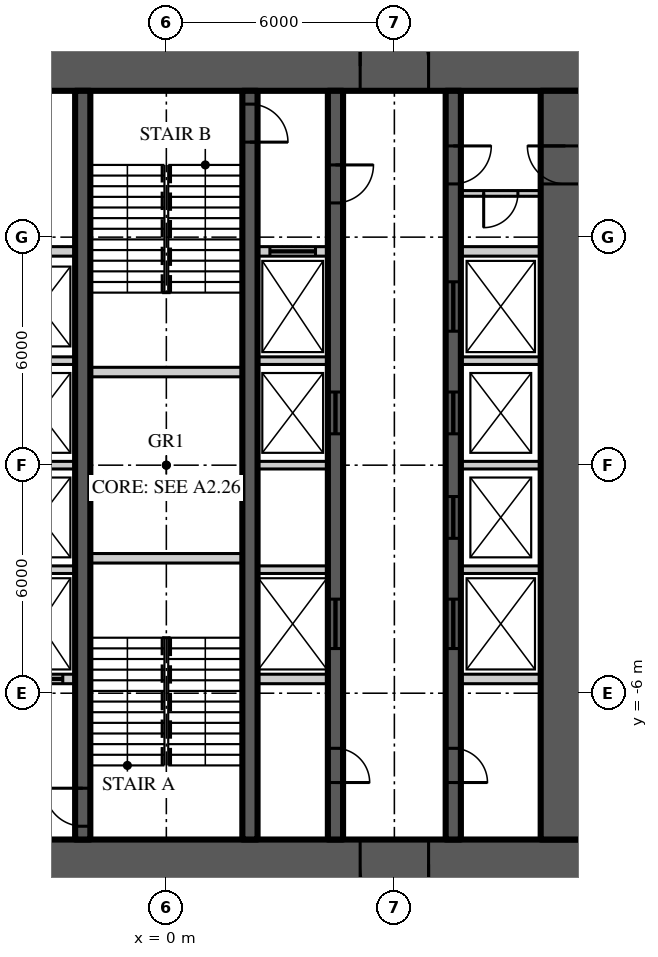
"""IFC4 building model, lengths in metres.
Left out: names, types, materials, properties, quantities, classifications, styles, units other than length and angle.
Written with IfcOpenShell. Run it as: python <this file> out.ifc"""

import sys

from ifc_helpers import new_model, si_unit, direction, frame, frame_2d, origin, place, context, subcontext, project, spatial, rectangle, extrude, element, fill, save


model = new_model("IFC4")
c1 = context("Model", 3, precision=1e-05, world=origin(), true_north=direction((0.0, 1.0)))
c2 = subcontext(c1, "Body", "Model", "MODEL_VIEW")
j1 = project(units=[si_unit("LENGTHUNIT", "METRE"), si_unit("PLANEANGLEUNIT", "RADIAN")], contexts=[c1])
p1 = place(None, origin())
s1 = spatial("IfcSite", under=j1, at=p1, CompositionType="ELEMENT")
p2 = place(p1, origin())
s2 = spatial("IfcBuilding", under=s1, at=p2, CompositionType="ELEMENT")
p3 = place(p2, frame((0.0, 0.0, 194.4)))
s3 = spatial("IfcBuildingStorey", under=s2, at=p3, CompositionType="ELEMENT", Elevation=194.4)
p4 = place(p3, frame((-11.15, 10.5, 0.0), z_axis=(0.0, 0.0, 1.0), x_axis=(1.0, 0.0, 0.0)))
e1 = element("IfcWall", 1, at=p4, inside=s3, PredefinedType="SHEAR", context=c2, shape_type="SweptSolid", body=[
    extrude(rectangle(XDim=22.3, YDim=1.3, at=frame_2d((11.15, 0.0))), origin(), (0.0, 0.0, 1.0), 4.5),
])
p5 = place(p4, frame((4.25, 0.0, 0.0)))
e2 = element("IfcOpeningElement", 2, at=p5, cuts=e1, PredefinedType="OPENING", context=c2, shape_type="SweptSolid", body=[
    extrude(rectangle(XDim=1.8, YDim=2.2, at=frame_2d((0.9, 1.1))), frame((0.0, 0.66, 0.0), z_axis=(0.0, -1.0, 0.0), x_axis=(1.0, 0.0, 0.0)), (0.0, 0.0, 1.0), 1.32),
])
p6 = place(p4, frame((16.25, 0.0, 0.0)))
e3 = element("IfcOpeningElement", 3, at=p6, cuts=e1, PredefinedType="OPENING", context=c2, shape_type="SweptSolid", body=[
    extrude(rectangle(XDim=1.8, YDim=2.2, at=frame_2d((0.9, 1.1))), frame((0.0, 0.66, 0.0), z_axis=(0.0, -1.0, 0.0), x_axis=(1.0, 0.0, 0.0)), (0.0, 0.0, 1.0), 1.32),
])
p7 = place(p3, frame((11.15, -10.5, 0.0), z_axis=(0.0, 0.0, 1.0), x_axis=(-1.0, 0.0, 0.0)))
e4 = element("IfcWall", 4, at=p7, inside=s3, PredefinedType="SHEAR", context=c2, shape_type="SweptSolid", body=[
    extrude(rectangle(XDim=22.3, YDim=1.3, at=frame_2d((11.15, 0.0))), origin(), (0.0, 0.0, 1.0), 4.5),
])
p8 = place(p7, frame((16.25, 0.0, 0.0)))
e5 = element("IfcOpeningElement", 5, at=p8, cuts=e4, PredefinedType="OPENING", context=c2, shape_type="SweptSolid", body=[
    extrude(rectangle(XDim=1.8, YDim=2.2, at=frame_2d((0.9, 1.1))), frame((0.0, 0.66, 0.0), z_axis=(0.0, -1.0, 0.0), x_axis=(1.0, 0.0, 0.0)), (0.0, 0.0, 1.0), 1.32),
])
p9 = place(p7, frame((4.25, 0.0, 0.0)))
e6 = element("IfcOpeningElement", 6, at=p9, cuts=e4, PredefinedType="OPENING", context=c2, shape_type="SweptSolid", body=[
    extrude(rectangle(XDim=1.8, YDim=2.2, at=frame_2d((0.9, 1.1))), frame((0.0, 0.66, 0.0), z_axis=(0.0, -1.0, 0.0), x_axis=(1.0, 0.0, 0.0)), (0.0, 0.0, 1.0), 1.32),
])
p10 = place(p3, frame((10.5, -9.85, 0.0), z_axis=(0.0, 0.0, 1.0), x_axis=(0.0, 1.0, 0.0)))
e7 = element("IfcWall", 7, at=p10, inside=s3, PredefinedType="SHEAR", context=c2, shape_type="SweptSolid", body=[
    extrude(rectangle(XDim=19.7, YDim=1.3, at=frame_2d((9.85, 0.0))), origin(), (0.0, 0.0, 1.0), 4.5),
])
p11 = place(p10, frame((17.25, 0.0, 0.0)))
e8 = element("IfcOpeningElement", 8, at=p11, cuts=e7, PredefinedType="OPENING", context=c2, shape_type="SweptSolid", body=[
    extrude(rectangle(XDim=1.0, YDim=2.2, at=frame_2d((0.5, 1.1))), frame((0.0, 0.66, 0.0), z_axis=(0.0, -1.0, 0.0), x_axis=(1.0, 0.0, 0.0)), (0.0, 0.0, 1.0), 1.32),
])
p12 = place(p3, frame((7.55, 9.85, 0.0), z_axis=(0.0, 0.0, 1.0), x_axis=(0.0, -1.0, 0.0)))
e9 = element("IfcWall", 9, at=p12, inside=s3, PredefinedType="SHEAR", context=c2, shape_type="SweptSolid", body=[
    extrude(rectangle(XDim=19.7, YDim=0.4, at=frame_2d((9.85, 0.0))), origin(), (0.0, 0.0, 1.0), 4.5),
])
p13 = place(p12, frame((1.45, 0.0, 0.0)))
e10 = element("IfcOpeningElement", 10, at=p13, cuts=e9, PredefinedType="OPENING", context=c2, shape_type="SweptSolid", body=[
    extrude(rectangle(XDim=1.0, YDim=2.2, at=frame_2d((0.5, 1.1))), frame((0.0, 0.21, 0.0), z_axis=(0.0, -1.0, 0.0), x_axis=(1.0, 0.0, 0.0)), (0.0, 0.0, 1.0), 0.42),
])
p14 = place(p12, frame((17.3, 0.0, 0.0)))
e11 = element("IfcOpeningElement", 11, at=p14, cuts=e9, PredefinedType="OPENING", context=c2, shape_type="SweptSolid", body=[
    extrude(rectangle(XDim=0.9, YDim=2.1, at=frame_2d((0.45, 1.05))), frame((0.0, 0.21, 0.0), z_axis=(0.0, -1.0, 0.0), x_axis=(1.0, 0.0, 0.0)), (0.0, 0.0, 1.0), 0.42),
])
p15 = place(p12, frame((7.925, 0.0, 0.0)))
e12 = element("IfcOpeningElement", 12, at=p15, cuts=e9, PredefinedType="OPENING", context=c2, shape_type="SweptSolid", body=[
    extrude(rectangle(XDim=1.1, YDim=2.2, at=frame_2d((0.55, 1.1))), frame((0.0, 0.21, 0.0), z_axis=(0.0, -1.0, 0.0), x_axis=(1.0, 0.0, 0.0)), (0.0, 0.0, 1.0), 0.42),
])
p16 = place(p12, frame((10.675, 0.0, 0.0)))
e13 = element("IfcOpeningElement", 13, at=p16, cuts=e9, PredefinedType="OPENING", context=c2, shape_type="SweptSolid", body=[
    extrude(rectangle(XDim=1.1, YDim=2.2, at=frame_2d((0.55, 1.1))), frame((0.0, 0.21, 0.0), z_axis=(0.0, -1.0, 0.0), x_axis=(1.0, 0.0, 0.0)), (0.0, 0.0, 1.0), 0.42),
])
p17 = place(p12, frame((5.025, 0.0, 0.0)))
e14 = element("IfcOpeningElement", 14, at=p17, cuts=e9, PredefinedType="OPENING", context=c2, shape_type="SweptSolid", body=[
    extrude(rectangle(XDim=1.3, YDim=2.2, at=frame_2d((0.65, 1.1))), frame((0.0, 0.21, 0.0), z_axis=(0.0, -1.0, 0.0), x_axis=(1.0, 0.0, 0.0)), (0.0, 0.0, 1.0), 0.42),
])
p18 = place(p12, frame((13.375, 0.0, 0.0)))
e15 = element("IfcOpeningElement", 15, at=p18, cuts=e9, PredefinedType="OPENING", context=c2, shape_type="SweptSolid", body=[
    extrude(rectangle(XDim=1.3, YDim=2.2, at=frame_2d((0.65, 1.1))), frame((0.0, 0.21, 0.0), z_axis=(0.0, -1.0, 0.0), x_axis=(1.0, 0.0, 0.0)), (0.0, 0.0, 1.0), 0.42),
])
p19 = place(p3, frame((4.45, 9.85, 0.0), z_axis=(0.0, 0.0, 1.0), x_axis=(0.0, -1.0, 0.0)))
e16 = element("IfcWall", 16, at=p19, inside=s3, PredefinedType="SHEAR", context=c2, shape_type="SweptSolid", body=[
    extrude(rectangle(XDim=19.7, YDim=0.4, at=frame_2d((9.85, 0.0))), origin(), (0.0, 0.0, 1.0), 4.5),
])
p20 = place(p19, frame((1.95, 0.0, 0.0)))
e17 = element("IfcOpeningElement", 17, at=p20, cuts=e16, PredefinedType="OPENING", context=c2, shape_type="SweptSolid", body=[
    extrude(rectangle(XDim=1.0, YDim=2.2, at=frame_2d((0.5, 1.1))), frame((0.0, 0.21, 0.0), z_axis=(0.0, -1.0, 0.0), x_axis=(1.0, 0.0, 0.0)), (0.0, 0.0, 1.0), 0.42),
])
p21 = place(p19, frame((17.3, 0.0, 0.0)))
e18 = element("IfcOpeningElement", 18, at=p21, cuts=e16, PredefinedType="OPENING", context=c2, shape_type="SweptSolid", body=[
    extrude(rectangle(XDim=0.9, YDim=2.1, at=frame_2d((0.45, 1.05))), frame((0.0, 0.21, 0.0), z_axis=(0.0, -1.0, 0.0), x_axis=(1.0, 0.0, 0.0)), (0.0, 0.0, 1.0), 0.42),
])
p22 = place(p19, frame((7.925, 0.0, 0.0)))
e19 = element("IfcOpeningElement", 19, at=p22, cuts=e16, PredefinedType="OPENING", context=c2, shape_type="SweptSolid", body=[
    extrude(rectangle(XDim=1.1, YDim=2.2, at=frame_2d((0.55, 1.1))), frame((0.0, 0.21, 0.0), z_axis=(0.0, -1.0, 0.0), x_axis=(1.0, 0.0, 0.0)), (0.0, 0.0, 1.0), 0.42),
])
p23 = place(p19, frame((13.375, 0.0, 0.0)))
e20 = element("IfcOpeningElement", 20, at=p23, cuts=e16, PredefinedType="OPENING", context=c2, shape_type="SweptSolid", body=[
    extrude(rectangle(XDim=1.3, YDim=2.2, at=frame_2d((0.65, 1.1))), frame((0.0, 0.21, 0.0), z_axis=(0.0, -1.0, 0.0), x_axis=(1.0, 0.0, 0.0)), (0.0, 0.0, 1.0), 0.42),
])
p24 = place(p3, frame((-2.2, -9.85, 0.0), z_axis=(0.0, 0.0, 1.0), x_axis=(0.0, 1.0, 0.0)))
e21 = element("IfcWall", 21, at=p24, inside=s3, PredefinedType="SHEAR", context=c2, shape_type="SweptSolid", body=[
    extrude(rectangle(XDim=19.7, YDim=0.4, at=frame_2d((9.85, 0.0))), origin(), (0.0, 0.0, 1.0), 4.5),
])
p25 = place(p24, frame((0.35, 0.0, 0.0)))
e22 = element("IfcOpeningElement", 22, at=p25, cuts=e21, PredefinedType="OPENING", context=c2, shape_type="SweptSolid", body=[
    extrude(rectangle(XDim=1.0, YDim=2.2, at=frame_2d((0.5, 1.1))), frame((0.0, 0.21, 0.0), z_axis=(0.0, -1.0, 0.0), x_axis=(1.0, 0.0, 0.0)), (0.0, 0.0, 1.0), 0.42),
])
p26 = place(p3, frame((2.2, 9.85, 0.0), z_axis=(0.0, 0.0, 1.0), x_axis=(0.0, -1.0, 0.0)))
e23 = element("IfcWall", 23, at=p26, inside=s3, PredefinedType="SHEAR", context=c2, shape_type="SweptSolid", body=[
    extrude(rectangle(XDim=19.7, YDim=0.4, at=frame_2d((9.85, 0.0))), origin(), (0.0, 0.0, 1.0), 4.5),
])
p27 = place(p26, frame((0.35, 0.0, 0.0)))
e24 = element("IfcOpeningElement", 24, at=p27, cuts=e23, PredefinedType="OPENING", context=c2, shape_type="SweptSolid", body=[
    extrude(rectangle(XDim=1.0, YDim=2.2, at=frame_2d((0.5, 1.1))), frame((0.0, 0.21, 0.0), z_axis=(0.0, -1.0, 0.0), x_axis=(1.0, 0.0, 0.0)), (0.0, 0.0, 1.0), 0.42),
])
p28 = place(p3, frame((-4.25, 5.625, 0.0), z_axis=(0.0, 0.0, 1.0), x_axis=(1.0, 0.0, 0.0)))
e25 = element("IfcWall", 25, at=p28, inside=s3, PredefinedType="SOLIDWALL", context=c2, shape_type="SweptSolid", body=[
    extrude(rectangle(XDim=1.85, YDim=0.25, at=frame_2d((0.925, 0.0))), origin(), (0.0, 0.0, 1.0), 4.3),
])
p29 = place(p3, frame((2.4, 5.625, 0.0), z_axis=(0.0, 0.0, 1.0), x_axis=(1.0, 0.0, 0.0)))
e26 = element("IfcWall", 26, at=p29, inside=s3, PredefinedType="SOLIDWALL", context=c2, shape_type="SweptSolid", body=[
    extrude(rectangle(XDim=1.85, YDim=0.25, at=frame_2d((0.925, 0.0))), origin(), (0.0, 0.0, 1.0), 4.3),
])
p30 = place(p29, frame((0.325, 0.0, 0.0)))
e27 = element("IfcOpeningElement", 27, at=p30, cuts=e26, PredefinedType="OPENING", context=c2, shape_type="SweptSolid", body=[
    extrude(rectangle(XDim=1.2, YDim=2.2, at=frame_2d((0.6, 1.1))), frame((0.0, 0.135, 0.0), z_axis=(0.0, -1.0, 0.0), x_axis=(1.0, 0.0, 0.0)), (0.0, 0.0, 1.0), 0.27),
])
p31 = place(p3, frame((7.75, 5.625, 0.0), z_axis=(0.0, 0.0, 1.0), x_axis=(1.0, 0.0, 0.0)))
e28 = element("IfcWall", 28, at=p31, inside=s3, PredefinedType="SOLIDWALL", context=c2, shape_type="SweptSolid", body=[
    extrude(rectangle(XDim=2.1, YDim=0.25, at=frame_2d((1.05, 0.0))), origin(), (0.0, 0.0, 1.0), 4.3),
])
p32 = place(p3, frame((-4.25, -5.625, 0.0), z_axis=(0.0, 0.0, 1.0), x_axis=(1.0, 0.0, 0.0)))
e29 = element("IfcWall", 29, at=p32, inside=s3, PredefinedType="SOLIDWALL", context=c2, shape_type="SweptSolid", body=[
    extrude(rectangle(XDim=1.85, YDim=0.25, at=frame_2d((0.925, 0.0))), origin(), (0.0, 0.0, 1.0), 4.3),
])
p33 = place(p32, frame((0.325, 0.0, 0.0)))
e30 = element("IfcOpeningElement", 30, at=p33, cuts=e29, PredefinedType="OPENING", context=c2, shape_type="SweptSolid", body=[
    extrude(rectangle(XDim=1.2, YDim=2.2, at=frame_2d((0.6, 1.1))), frame((0.0, 0.135, 0.0), z_axis=(0.0, -1.0, 0.0), x_axis=(1.0, 0.0, 0.0)), (0.0, 0.0, 1.0), 0.27),
])
p34 = place(p3, frame((2.4, -5.625, 0.0), z_axis=(0.0, 0.0, 1.0), x_axis=(1.0, 0.0, 0.0)))
e31 = element("IfcWall", 31, at=p34, inside=s3, PredefinedType="SOLIDWALL", context=c2, shape_type="SweptSolid", body=[
    extrude(rectangle(XDim=1.85, YDim=0.25, at=frame_2d((0.925, 0.0))), origin(), (0.0, 0.0, 1.0), 4.3),
])
p35 = place(p3, frame((7.75, -5.625, 0.0), z_axis=(0.0, 0.0, 1.0), x_axis=(1.0, 0.0, 0.0)))
e32 = element("IfcWall", 32, at=p35, inside=s3, PredefinedType="SOLIDWALL", context=c2, shape_type="SweptSolid", body=[
    extrude(rectangle(XDim=2.1, YDim=0.25, at=frame_2d((1.05, 0.0))), origin(), (0.0, 0.0, 1.0), 4.3),
])
for number, where, z_axis, x_axis in (
    (33, (-2.0, -2.45, 0.0), (0.0, 0.0, 1.0), (1.0, 0.0, 0.0)),
    (34, (-2.0, 2.45, 0.0), (0.0, 0.0, 1.0), (1.0, 0.0, 0.0)),
):
    element("IfcWall", number, at=place(p3, frame(where, z_axis=z_axis, x_axis=x_axis)), inside=s3, PredefinedType="SOLIDWALL", context=c2, shape_type="SweptSolid", body=[
        extrude(rectangle(XDim=4.0, YDim=0.25, at=frame_2d((2.0, 0.0))), origin(), (0.0, 0.0, 1.0), 4.3),
    ])
for number, where, z_axis, x_axis in (
    (35, (-4.25, -2.75, 0.0), (0.0, 0.0, 1.0), (1.0, 0.0, 0.0)),
    (36, (2.4, -2.75, 0.0), (0.0, 0.0, 1.0), (1.0, 0.0, 0.0)),
):
    element("IfcWall", number, at=place(p3, frame(where, z_axis=z_axis, x_axis=x_axis)), inside=s3, PredefinedType="SOLIDWALL", context=c2, shape_type="SweptSolid", body=[
        extrude(rectangle(XDim=1.85, YDim=0.2, at=frame_2d((0.925, 0.0))), origin(), (0.0, 0.0, 1.0), 4.3),
    ])
p36 = place(p3, frame((7.75, -2.75, 0.0), z_axis=(0.0, 0.0, 1.0), x_axis=(1.0, 0.0, 0.0)))
e37 = element("IfcWall", 37, at=p36, inside=s3, PredefinedType="SOLIDWALL", context=c2, shape_type="SweptSolid", body=[
    extrude(rectangle(XDim=2.1, YDim=0.2, at=frame_2d((1.05, 0.0))), origin(), (0.0, 0.0, 1.0), 4.3),
])
for number, where, z_axis, x_axis in (
    (38, (-4.25, 0.0, 0.0), (0.0, 0.0, 1.0), (1.0, 0.0, 0.0)),
    (39, (2.4, 0.0, 0.0), (0.0, 0.0, 1.0), (1.0, 0.0, 0.0)),
):
    element("IfcWall", number, at=place(p3, frame(where, z_axis=z_axis, x_axis=x_axis)), inside=s3, PredefinedType="SOLIDWALL", context=c2, shape_type="SweptSolid", body=[
        extrude(rectangle(XDim=1.85, YDim=0.2, at=frame_2d((0.925, 0.0))), origin(), (0.0, 0.0, 1.0), 4.3),
    ])
p37 = place(p3, frame((7.75, 0.0, 0.0), z_axis=(0.0, 0.0, 1.0), x_axis=(1.0, 0.0, 0.0)))
e40 = element("IfcWall", 40, at=p37, inside=s3, PredefinedType="SOLIDWALL", context=c2, shape_type="SweptSolid", body=[
    extrude(rectangle(XDim=2.1, YDim=0.2, at=frame_2d((1.05, 0.0))), origin(), (0.0, 0.0, 1.0), 4.3),
])
for number, where, z_axis, x_axis in (
    (41, (-4.25, 2.75, 0.0), (0.0, 0.0, 1.0), (1.0, 0.0, 0.0)),
    (42, (2.4, 2.75, 0.0), (0.0, 0.0, 1.0), (1.0, 0.0, 0.0)),
):
    element("IfcWall", number, at=place(p3, frame(where, z_axis=z_axis, x_axis=x_axis)), inside=s3, PredefinedType="SOLIDWALL", context=c2, shape_type="SweptSolid", body=[
        extrude(rectangle(XDim=1.85, YDim=0.2, at=frame_2d((0.925, 0.0))), origin(), (0.0, 0.0, 1.0), 4.3),
    ])
p38 = place(p3, frame((7.75, 2.75, 0.0), z_axis=(0.0, 0.0, 1.0), x_axis=(1.0, 0.0, 0.0)))
e43 = element("IfcWall", 43, at=p38, inside=s3, PredefinedType="SOLIDWALL", context=c2, shape_type="SweptSolid", body=[
    extrude(rectangle(XDim=2.1, YDim=0.2, at=frame_2d((1.05, 0.0))), origin(), (0.0, 0.0, 1.0), 4.3),
])
p39 = place(p3, frame((9.85, 7.15, 0.0), z_axis=(0.0, 0.0, 1.0), x_axis=(-1.0, 0.0, 0.0)))
e44 = element("IfcWall", 44, at=p39, inside=s3, PredefinedType="SOLIDWALL", context=c2, shape_type="SweptSolid", body=[
    extrude(rectangle(XDim=2.1, YDim=0.15, at=frame_2d((1.05, 0.0))), origin(), (0.0, 0.0, 1.0), 4.32),
])
p40 = place(p39, frame((0.6, 0.0, 0.0)))
e45 = element("IfcOpeningElement", 45, at=p40, cuts=e44, PredefinedType="OPENING", context=c2, shape_type="SweptSolid", body=[
    extrude(rectangle(XDim=0.9, YDim=2.1, at=frame_2d((0.45, 1.05))), frame((0.0, 0.085, 0.0), z_axis=(0.0, -1.0, 0.0), x_axis=(1.0, 0.0, 0.0)), (0.0, 0.0, 1.0), 0.17),
])
p41 = place(p6, origin())
e46 = element("IfcDoor", 46, at=p41, inside=s3, OperationType="DOUBLE_DOOR_DOUBLE_SWING", PredefinedType="DOOR", context=c2, shape_type="SweptSolid", body=[
    extrude(rectangle(XDim=1.8, YDim=2.2, at=frame_2d((0.9, 1.1))), frame((0.0, 0.025, 0.0), z_axis=(0.0, -1.0, 0.0), x_axis=(1.0, 0.0, 0.0)), (0.0, 0.0, 1.0), 0.05),
])
fill(e3, e46)
p42 = place(p9, origin())
e47 = element("IfcDoor", 47, at=p42, inside=s3, OperationType="DOUBLE_DOOR_DOUBLE_SWING", PredefinedType="DOOR", context=c2, shape_type="SweptSolid", body=[
    extrude(rectangle(XDim=1.8, YDim=2.2, at=frame_2d((0.9, 1.1))), frame((0.0, 0.025, 0.0), z_axis=(0.0, -1.0, 0.0), x_axis=(1.0, 0.0, 0.0)), (0.0, 0.0, 1.0), 0.05),
])
fill(e6, e47)
p43 = place(p13, origin())
e48 = element("IfcDoor", 48, at=p43, inside=s3, OperationType="SINGLE_SWING_LEFT", PredefinedType="DOOR", context=c2, shape_type="SweptSolid", body=[
    extrude(rectangle(XDim=1.0, YDim=2.2, at=frame_2d((0.5, 1.1))), frame((0.0, 0.025, 0.0), z_axis=(0.0, -1.0, 0.0), x_axis=(1.0, 0.0, 0.0)), (0.0, 0.0, 1.0), 0.05),
])
fill(e10, e48)
p44 = place(p11, origin())
e49 = element("IfcDoor", 49, at=p44, inside=s3, OperationType="SINGLE_SWING_RIGHT", PredefinedType="DOOR", context=c2, shape_type="SweptSolid", body=[
    extrude(rectangle(XDim=1.0, YDim=2.2, at=frame_2d((0.5, 1.1))), frame((0.0, 0.025, 0.0), z_axis=(0.0, -1.0, 0.0), x_axis=(1.0, 0.0, 0.0)), (0.0, 0.0, 1.0), 0.05),
])
fill(e8, e49)
p45 = place(p25, origin())
e50 = element("IfcDoor", 50, at=p45, inside=s3, OperationType="SINGLE_SWING_RIGHT", PredefinedType="DOOR", context=c2, shape_type="SweptSolid", body=[
    extrude(rectangle(XDim=1.0, YDim=2.2, at=frame_2d((0.5, 1.1))), frame((0.0, 0.025, 0.0), z_axis=(0.0, -1.0, 0.0), x_axis=(1.0, 0.0, 0.0)), (0.0, 0.0, 1.0), 0.05),
])
fill(e22, e50)
p46 = place(p20, origin())
e51 = element("IfcDoor", 51, at=p46, inside=s3, OperationType="SINGLE_SWING_LEFT", PredefinedType="DOOR", context=c2, shape_type="SweptSolid", body=[
    extrude(rectangle(XDim=1.0, YDim=2.2, at=frame_2d((0.5, 1.1))), frame((0.0, 0.025, 0.0), z_axis=(0.0, -1.0, 0.0), x_axis=(1.0, 0.0, 0.0)), (0.0, 0.0, 1.0), 0.05),
])
fill(e17, e51)
p47 = place(p27, origin())
e52 = element("IfcDoor", 52, at=p47, inside=s3, OperationType="SINGLE_SWING_RIGHT", PredefinedType="DOOR", context=c2, shape_type="SweptSolid", body=[
    extrude(rectangle(XDim=1.0, YDim=2.2, at=frame_2d((0.5, 1.1))), frame((0.0, 0.025, 0.0), z_axis=(0.0, -1.0, 0.0), x_axis=(1.0, 0.0, 0.0)), (0.0, 0.0, 1.0), 0.05),
])
fill(e24, e52)
p48 = place(p14, origin())
e53 = element("IfcDoor", 53, at=p48, inside=s3, OperationType="SINGLE_SWING_RIGHT", PredefinedType="DOOR", context=c2, shape_type="SweptSolid", body=[
    extrude(rectangle(XDim=0.9, YDim=2.1, at=frame_2d((0.45, 1.05))), frame((0.0, 0.025, 0.0), z_axis=(0.0, -1.0, 0.0), x_axis=(1.0, 0.0, 0.0)), (0.0, 0.0, 1.0), 0.05),
])
fill(e11, e53)
p49 = place(p21, origin())
e54 = element("IfcDoor", 54, at=p49, inside=s3, OperationType="SINGLE_SWING_RIGHT", PredefinedType="DOOR", context=c2, shape_type="SweptSolid", body=[
    extrude(rectangle(XDim=0.9, YDim=2.1, at=frame_2d((0.45, 1.05))), frame((0.0, 0.025, 0.0), z_axis=(0.0, -1.0, 0.0), x_axis=(1.0, 0.0, 0.0)), (0.0, 0.0, 1.0), 0.05),
])
fill(e18, e54)
p50 = place(p15, origin())
e55 = element("IfcDoor", 55, at=p50, inside=s3, OperationType="SLIDING_TO_LEFT", PredefinedType="DOOR", context=c2, shape_type="SweptSolid", body=[
    extrude(rectangle(XDim=1.1, YDim=2.2, at=frame_2d((0.55, 1.1))), frame((0.0, 0.025, 0.0), z_axis=(0.0, -1.0, 0.0), x_axis=(1.0, 0.0, 0.0)), (0.0, 0.0, 1.0), 0.05),
])
fill(e12, e55)
p51 = place(p16, origin())
e56 = element("IfcDoor", 56, at=p51, inside=s3, OperationType="SLIDING_TO_LEFT", PredefinedType="DOOR", context=c2, shape_type="SweptSolid", body=[
    extrude(rectangle(XDim=1.1, YDim=2.2, at=frame_2d((0.55, 1.1))), frame((0.0, 0.025, 0.0), z_axis=(0.0, -1.0, 0.0), x_axis=(1.0, 0.0, 0.0)), (0.0, 0.0, 1.0), 0.05),
])
fill(e13, e56)
p52 = place(p22, origin())
e57 = element("IfcDoor", 57, at=p52, inside=s3, OperationType="SLIDING_TO_LEFT", PredefinedType="DOOR", context=c2, shape_type="SweptSolid", body=[
    extrude(rectangle(XDim=1.1, YDim=2.2, at=frame_2d((0.55, 1.1))), frame((0.0, 0.025, 0.0), z_axis=(0.0, -1.0, 0.0), x_axis=(1.0, 0.0, 0.0)), (0.0, 0.0, 1.0), 0.05),
])
fill(e19, e57)
p53 = place(p17, origin())
e58 = element("IfcDoor", 58, at=p53, inside=s3, OperationType="SLIDING_TO_LEFT", PredefinedType="DOOR", context=c2, shape_type="SweptSolid", body=[
    extrude(rectangle(XDim=1.3, YDim=2.2, at=frame_2d((0.65, 1.1))), frame((0.0, 0.025, 0.0), z_axis=(0.0, -1.0, 0.0), x_axis=(1.0, 0.0, 0.0)), (0.0, 0.0, 1.0), 0.05),
])
fill(e14, e58)
p54 = place(p18, origin())
e59 = element("IfcDoor", 59, at=p54, inside=s3, OperationType="SLIDING_TO_LEFT", PredefinedType="DOOR", context=c2, shape_type="SweptSolid", body=[
    extrude(rectangle(XDim=1.3, YDim=2.2, at=frame_2d((0.65, 1.1))), frame((0.0, 0.025, 0.0), z_axis=(0.0, -1.0, 0.0), x_axis=(1.0, 0.0, 0.0)), (0.0, 0.0, 1.0), 0.05),
])
fill(e15, e59)
p55 = place(p23, origin())
e60 = element("IfcDoor", 60, at=p55, inside=s3, OperationType="SLIDING_TO_LEFT", PredefinedType="DOOR", context=c2, shape_type="SweptSolid", body=[
    extrude(rectangle(XDim=1.3, YDim=2.2, at=frame_2d((0.65, 1.1))), frame((0.0, 0.025, 0.0), z_axis=(0.0, -1.0, 0.0), x_axis=(1.0, 0.0, 0.0)), (0.0, 0.0, 1.0), 0.05),
])
fill(e20, e60)
p56 = place(p33, origin())
e61 = element("IfcDoor", 61, at=p56, inside=s3, OperationType="SLIDING_TO_LEFT", PredefinedType="DOOR", context=c2, shape_type="SweptSolid", body=[
    extrude(rectangle(XDim=1.2, YDim=2.2, at=frame_2d((0.6, 1.1))), frame((0.0, 0.025, 0.0), z_axis=(0.0, -1.0, 0.0), x_axis=(1.0, 0.0, 0.0)), (0.0, 0.0, 1.0), 0.05),
])
fill(e30, e61)
p57 = place(p30, origin())
e62 = element("IfcDoor", 62, at=p57, inside=s3, OperationType="SLIDING_TO_LEFT", PredefinedType="DOOR", context=c2, shape_type="SweptSolid", body=[
    extrude(rectangle(XDim=1.2, YDim=2.2, at=frame_2d((0.6, 1.1))), frame((0.0, 0.025, 0.0), z_axis=(0.0, -1.0, 0.0), x_axis=(1.0, 0.0, 0.0)), (0.0, 0.0, 1.0), 0.05),
])
fill(e27, e62)
p58 = place(p40, origin())
e63 = element("IfcDoor", 63, at=p58, inside=s3, OperationType="SINGLE_SWING_RIGHT", PredefinedType="DOOR", context=c2, shape_type="SweptSolid", body=[
    extrude(rectangle(XDim=0.9, YDim=2.1, at=frame_2d((0.45, 1.05))), frame((0.0, 0.025, 0.0), z_axis=(0.0, -1.0, 0.0), x_axis=(1.0, 0.0, 0.0)), (0.0, 0.0, 1.0), 0.05),
])
fill(e45, e63)
save(model, sys.argv[1])
